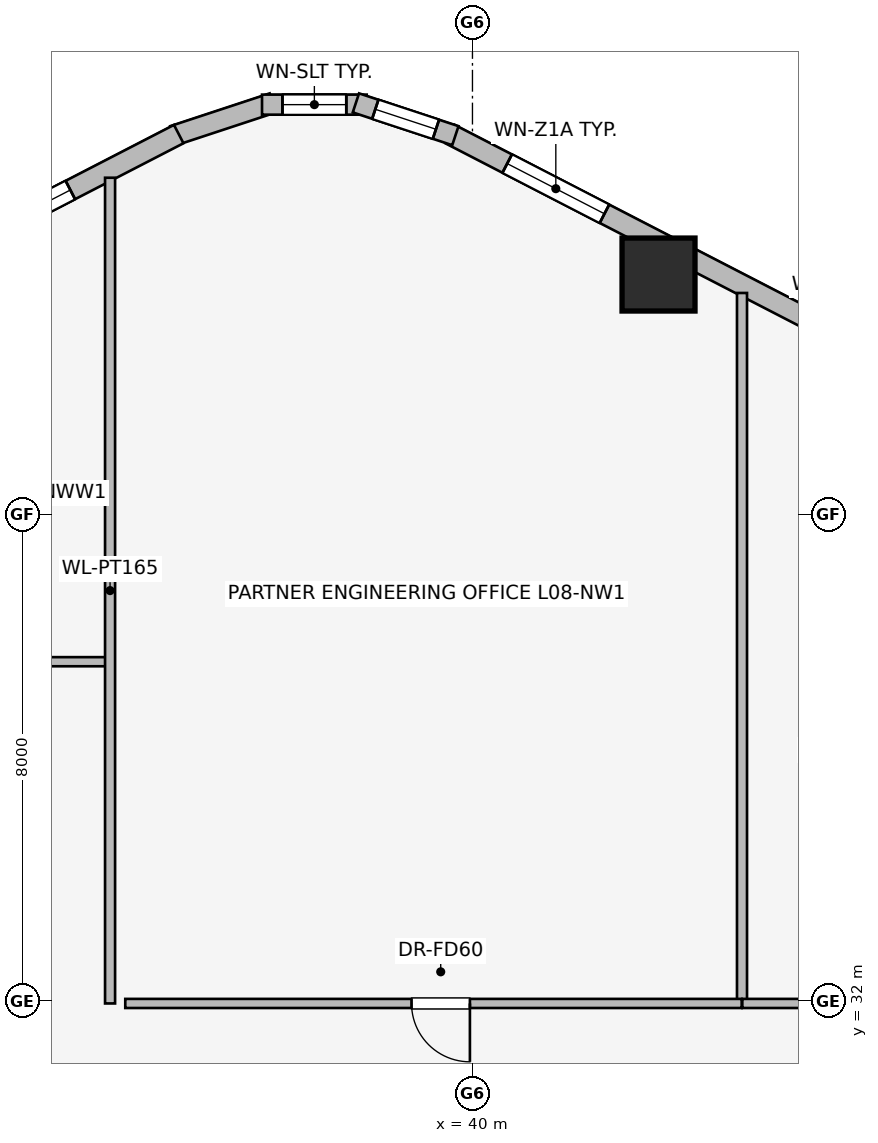
"""IFC4 building model, lengths in metres.
Left out: names, types, materials, properties, quantities, classifications, styles, units other than length and angle.
Written with IfcOpenShell. Run it as: python <this file> out.ifc"""

import sys

from ifc_helpers import new_model, si_unit, direction, frame, frame_2d, origin, origin_2d, place, context, subcontext, project, spatial, rectangle, extrude, element, fill, save


model = new_model("IFC4")
c1 = context("Model", 3, precision=1e-05, world=origin(), true_north=direction((0.0, 1.0)))
c2 = subcontext(c1, "Body", "Model", "MODEL_VIEW")
j1 = project(units=[si_unit("LENGTHUNIT", "METRE"), si_unit("PLANEANGLEUNIT", "RADIAN")], contexts=[c1])
p1 = place(None, origin())
s1 = spatial("IfcSite", under=j1, at=p1, CompositionType="ELEMENT")
p2 = place(p1, origin())
s2 = spatial("IfcBuilding", under=s1, at=p2, CompositionType="ELEMENT")
p3 = place(p2, frame((0.0, 0.0, 34.3)))
s3 = spatial("IfcBuildingStorey", under=s2, at=p3, CompositionType="ELEMENT", Elevation=34.3)
p4 = place(p3, frame((43.06, 43.947, 0.0), z_axis=(0.0, 0.0, 1.0), x_axis=(1.0, 0.0, 0.0)))
e1 = element("IfcColumn", 1, at=p4, inside=s3, PredefinedType="COLUMN", context=c2, shape_type="SweptSolid", body=[
    extrude(rectangle(XDim=1.2, YDim=1.2, at=origin_2d()), origin(), (0.0, 0.0, 1.0), 3.65),
])
p5 = place(p3, frame((39.631, 46.257, 0.0), z_axis=(0.0, 0.0, 1.0), x_axis=(0.888634413993, -0.458616264721, 0.0)))
e2 = element("IfcWall", 2, at=p5, inside=s3, PredefinedType="STANDARD", context=c2, shape_type="SweptSolid", body=[
    extrude(rectangle(XDim=20.531, YDim=0.34, at=frame_2d((10.266, 0.0))), origin(), (0.0, 0.0, 1.0), 2.684),
])
p6 = place(p5, frame((1.058, 0.0, 0.75)))
e3 = element("IfcOpeningElement", 3, at=p6, cuts=e2, PredefinedType="OPENING", context=c2, shape_type="SweptSolid", body=[
    extrude(rectangle(XDim=1.8, YDim=1.5, at=frame_2d((0.9, 0.75))), frame((0.0, 0.18, 0.0), z_axis=(0.0, -1.0, 0.0), x_axis=(1.0, 0.0, 0.0)), (0.0, 0.0, 1.0), 0.36),
])
p7 = place(p5, frame((6.721, 0.0, 0.75)))
e4 = element("IfcOpeningElement", 4, at=p7, cuts=e2, PredefinedType="OPENING", context=c2, shape_type="SweptSolid", body=[
    extrude(rectangle(XDim=1.5, YDim=1.5, at=frame_2d((0.75, 0.75))), frame((0.0, 0.18, 0.0), z_axis=(0.0, -1.0, 0.0), x_axis=(1.0, 0.0, 0.0)), (0.0, 0.0, 1.0), 0.36),
])
p8 = place(p5, frame((10.007, 0.0, 0.75)))
e5 = element("IfcOpeningElement", 5, at=p8, cuts=e2, PredefinedType="OPENING", context=c2, shape_type="SweptSolid", body=[
    extrude(rectangle(XDim=1.5, YDim=1.5, at=frame_2d((0.75, 0.75))), frame((0.0, 0.18, 0.0), z_axis=(0.0, -1.0, 0.0), x_axis=(1.0, 0.0, 0.0)), (0.0, 0.0, 1.0), 0.36),
])
p9 = place(p5, frame((13.292, 0.0, 0.75)))
e6 = element("IfcOpeningElement", 6, at=p9, cuts=e2, PredefinedType="OPENING", context=c2, shape_type="SweptSolid", body=[
    extrude(rectangle(XDim=1.5, YDim=1.5, at=frame_2d((0.75, 0.75))), frame((0.0, 0.18, 0.0), z_axis=(0.0, -1.0, 0.0), x_axis=(1.0, 0.0, 0.0)), (0.0, 0.0, 1.0), 0.36),
])
p10 = place(p5, frame((17.673, 0.0, 0.75)))
e7 = element("IfcOpeningElement", 7, at=p10, cuts=e2, PredefinedType="OPENING", context=c2, shape_type="SweptSolid", body=[
    extrude(rectangle(XDim=1.8, YDim=1.5, at=frame_2d((0.9, 0.75))), frame((0.0, 0.18, 0.0), z_axis=(0.0, -1.0, 0.0), x_axis=(1.0, 0.0, 0.0)), (0.0, 0.0, 1.0), 0.36),
])
p11 = place(p3, frame((35.081, 46.231, 0.0), z_axis=(0.0, 0.0, 1.0), x_axis=(0.94976901097, 0.312951794691, 0.0)))
e8 = element("IfcWall", 8, at=p11, inside=s3, PredefinedType="STANDARD", context=c2, shape_type="SweptSolid", body=[
    extrude(rectangle(XDim=1.722, YDim=0.33, at=frame_2d((0.861, 0.0))), origin(), (0.0, 0.0, 1.0), 3.39),
])
p12 = place(p3, frame((36.539, 46.741, 0.0), z_axis=(0.0, 0.0, 1.0), x_axis=(1.0, 0.0, 0.0)))
e9 = element("IfcWall", 9, at=p12, inside=s3, PredefinedType="STANDARD", context=c2, shape_type="SweptSolid", body=[
    extrude(rectangle(XDim=1.722, YDim=0.33, at=frame_2d((0.861, 0.0))), origin(), (0.0, 0.0, 1.0), 3.39),
])
p13 = place(p12, frame((0.336, 0.0, 0.75)))
e10 = element("IfcOpeningElement", 10, at=p13, cuts=e9, PredefinedType="OPENING", context=c2, shape_type="SweptSolid", body=[
    extrude(rectangle(XDim=1.05, YDim=1.4, at=frame_2d((0.525, 0.7))), frame((0.0, 0.175, 0.0), z_axis=(0.0, -1.0, 0.0), x_axis=(1.0, 0.0, 0.0)), (0.0, 0.0, 1.0), 0.35),
])
p14 = place(p3, frame((38.083, 46.77, 0.0), z_axis=(0.0, 0.0, 1.0), x_axis=(0.94976901097, -0.312951794691, 0.0)))
e11 = element("IfcWall", 11, at=p14, inside=s3, PredefinedType="STANDARD", context=c2, shape_type="SweptSolid", body=[
    extrude(rectangle(XDim=1.722, YDim=0.33, at=frame_2d((0.861, 0.0))), origin(), (0.0, 0.0, 1.0), 3.39),
])
p15 = place(p14, frame((0.336, 0.0, 0.75)))
e12 = element("IfcOpeningElement", 12, at=p15, cuts=e11, PredefinedType="OPENING", context=c2, shape_type="SweptSolid", body=[
    extrude(rectangle(XDim=1.05, YDim=1.4, at=frame_2d((0.525, 0.7))), frame((0.0, 0.175, 0.0), z_axis=(0.0, -1.0, 0.0), x_axis=(1.0, 0.0, 0.0)), (0.0, 0.0, 1.0), 0.35),
])
p16 = place(p3, frame((16.924, 36.841, 0.0), z_axis=(0.0, 0.0, 1.0), x_axis=(0.888634413993, 0.458616264721, 0.0)))
e13 = element("IfcWall", 13, at=p16, inside=s3, PredefinedType="STANDARD", context=c2, shape_type="SweptSolid", body=[
    extrude(rectangle(XDim=20.531, YDim=0.34, at=frame_2d((10.266, 0.0))), origin(), (0.0, 0.0, 1.0), 2.684),
])
p17 = place(p16, frame((2.161, 0.0, 0.75)))
e14 = element("IfcOpeningElement", 14, at=p17, cuts=e13, PredefinedType="OPENING", context=c2, shape_type="SweptSolid", body=[
    extrude(rectangle(XDim=1.05, YDim=1.4, at=frame_2d((0.525, 0.7))), frame((0.0, 0.18, 0.0), z_axis=(0.0, -1.0, 0.0), x_axis=(1.0, 0.0, 0.0)), (0.0, 0.0, 1.0), 0.36),
])
p18 = place(p16, frame((5.903, 0.0, 0.75)))
e15 = element("IfcOpeningElement", 15, at=p18, cuts=e13, PredefinedType="OPENING", context=c2, shape_type="SweptSolid", body=[
    extrude(rectangle(XDim=1.5, YDim=1.5, at=frame_2d((0.75, 0.75))), frame((0.0, 0.18, 0.0), z_axis=(0.0, -1.0, 0.0), x_axis=(1.0, 0.0, 0.0)), (0.0, 0.0, 1.0), 0.36),
])
p19 = place(p16, frame((9.516, 0.0, 0.75)))
e16 = element("IfcOpeningElement", 16, at=p19, cuts=e13, PredefinedType="OPENING", context=c2, shape_type="SweptSolid", body=[
    extrude(rectangle(XDim=1.5, YDim=1.5, at=frame_2d((0.75, 0.75))), frame((0.0, 0.18, 0.0), z_axis=(0.0, -1.0, 0.0), x_axis=(1.0, 0.0, 0.0)), (0.0, 0.0, 1.0), 0.36),
])
p20 = place(p16, frame((13.129, 0.0, 0.75)))
e17 = element("IfcOpeningElement", 17, at=p20, cuts=e13, PredefinedType="OPENING", context=c2, shape_type="SweptSolid", body=[
    extrude(rectangle(XDim=1.5, YDim=1.5, at=frame_2d((0.75, 0.75))), frame((0.0, 0.18, 0.0), z_axis=(0.0, -1.0, 0.0), x_axis=(1.0, 0.0, 0.0)), (0.0, 0.0, 1.0), 0.36),
])
p21 = place(p16, frame((17.476, 0.0, 0.75)))
e18 = element("IfcOpeningElement", 18, at=p21, cuts=e13, PredefinedType="OPENING", context=c2, shape_type="SweptSolid", body=[
    extrude(rectangle(XDim=1.05, YDim=1.4, at=frame_2d((0.525, 0.7))), frame((0.0, 0.18, 0.0), z_axis=(0.0, -1.0, 0.0), x_axis=(1.0, 0.0, 0.0)), (0.0, 0.0, 1.0), 0.36),
])
p22 = place(p3, frame((34.0, 37.58, 0.0), z_axis=(0.0, 0.0, 1.0), x_axis=(-1.0, 0.0, 0.0)))
e19 = element("IfcWall", 19, at=p22, inside=s3, PredefinedType="PARTITIONING", context=c2, shape_type="SweptSolid", body=[
    extrude(rectangle(XDim=15.6, YDim=0.15, at=frame_2d((7.8, 0.0))), origin(), (0.0, 0.0, 1.0), 3.39),
])
p23 = place(p22, frame((5.195, 0.0, 0.0)))
e20 = element("IfcOpeningElement", 20, at=p23, cuts=e19, PredefinedType="OPENING", context=c2, shape_type="SweptSolid", body=[
    extrude(rectangle(XDim=0.96, YDim=2.0, at=frame_2d((0.48, 1.0))), frame((0.0, 0.085, 0.0), z_axis=(0.0, -1.0, 0.0), x_axis=(1.0, 0.0, 0.0)), (0.0, 0.0, 1.0), 0.17),
])
p24 = place(p3, frame((34.04, 31.96, 0.0), z_axis=(0.0, 0.0, 1.0), x_axis=(0.0, 1.0, 0.0)))
e21 = element("IfcWall", 21, at=p24, inside=s3, PredefinedType="PARTITIONING", context=c2, shape_type="SweptSolid", body=[
    extrude(rectangle(XDim=13.579, YDim=0.165, at=frame_2d((6.79, 0.0))), origin(), (0.0, 0.0, 1.0), 3.39),
])
p25 = place(p3, frame((44.433, 31.97, 0.0), z_axis=(0.0, 0.0, 1.0), x_axis=(0.0, 1.0, 0.0)))
e22 = element("IfcWall", 22, at=p25, inside=s3, PredefinedType="PARTITIONING", context=c2, shape_type="SweptSolid", body=[
    extrude(rectangle(XDim=11.674, YDim=0.165, at=frame_2d((5.837, 0.0))), origin(), (0.0, 0.0, 1.0), 3.39),
])
p26 = place(p3, frame((44.428, 31.96, 0.0), z_axis=(0.0, 0.0, 1.0), x_axis=(-1.0, 0.0, 0.0)))
e23 = element("IfcWall", 23, at=p26, inside=s3, PredefinedType="PARTITIONING", context=c2, shape_type="SweptSolid", body=[
    extrude(rectangle(XDim=10.138, YDim=0.15, at=frame_2d((5.069, 0.0))), origin(), (0.0, 0.0, 1.0), 3.39),
])
p27 = place(p26, frame((4.47, 0.0, 0.0)))
e24 = element("IfcOpeningElement", 24, at=p27, cuts=e23, PredefinedType="OPENING", context=c2, shape_type="SweptSolid", body=[
    extrude(rectangle(XDim=0.96, YDim=2.0, at=frame_2d((0.48, 1.0))), frame((0.0, 0.085, 0.0), z_axis=(0.0, -1.0, 0.0), x_axis=(1.0, 0.0, 0.0)), (0.0, 0.0, 1.0), 0.17),
])
p28 = place(p3, frame((60.032, 31.96, 0.0), z_axis=(0.0, 0.0, 1.0), x_axis=(-1.0, 0.0, 0.0)))
e25 = element("IfcWall", 25, at=p28, inside=s3, PredefinedType="PARTITIONING", context=c2, shape_type="SweptSolid", body=[
    extrude(rectangle(XDim=15.594, YDim=0.15, at=frame_2d((7.797, 0.0))), origin(), (0.0, 0.0, 1.0), 3.39),
])
p29 = place(p28, frame((7.437, 0.0, 0.0)))
e26 = element("IfcOpeningElement", 26, at=p29, cuts=e25, PredefinedType="OPENING", context=c2, shape_type="SweptSolid", body=[
    extrude(rectangle(XDim=0.96, YDim=2.0, at=frame_2d((0.48, 1.0))), frame((0.0, 0.085, 0.0), z_axis=(0.0, -1.0, 0.0), x_axis=(1.0, 0.0, 0.0)), (0.0, 0.0, 1.0), 0.17),
])
p30 = place(p6, origin())
e27 = element("IfcWindow", 27, at=p30, inside=s3, PartitioningType="SINGLE_PANEL", PredefinedType="WINDOW", context=c2, shape_type="SweptSolid", body=[
    extrude(rectangle(XDim=1.8, YDim=1.5, at=frame_2d((0.9, 0.75))), frame((0.0, 0.03, 0.0), z_axis=(0.0, -1.0, 0.0), x_axis=(1.0, 0.0, 0.0)), (0.0, 0.0, 1.0), 0.06),
])
fill(e3, e27)
p31 = place(p13, origin())
e28 = element("IfcWindow", 28, at=p31, inside=s3, PartitioningType="SINGLE_PANEL", PredefinedType="WINDOW", context=c2, shape_type="SweptSolid", body=[
    extrude(rectangle(XDim=1.05, YDim=1.4, at=frame_2d((0.525, 0.7))), frame((0.0, 0.03, 0.0), z_axis=(0.0, -1.0, 0.0), x_axis=(1.0, 0.0, 0.0)), (0.0, 0.0, 1.0), 0.06),
])
fill(e10, e28)
p32 = place(p15, origin())
e29 = element("IfcWindow", 29, at=p32, inside=s3, PartitioningType="SINGLE_PANEL", PredefinedType="WINDOW", context=c2, shape_type="SweptSolid", body=[
    extrude(rectangle(XDim=1.05, YDim=1.4, at=frame_2d((0.525, 0.7))), frame((0.0, 0.03, 0.0), z_axis=(0.0, -1.0, 0.0), x_axis=(1.0, 0.0, 0.0)), (0.0, 0.0, 1.0), 0.06),
])
fill(e12, e29)
p33 = place(p21, origin())
e30 = element("IfcWindow", 30, at=p33, inside=s3, PartitioningType="SINGLE_PANEL", PredefinedType="WINDOW", context=c2, shape_type="SweptSolid", body=[
    extrude(rectangle(XDim=1.05, YDim=1.4, at=frame_2d((0.525, 0.7))), frame((0.0, 0.03, 0.0), z_axis=(0.0, -1.0, 0.0), x_axis=(1.0, 0.0, 0.0)), (0.0, 0.0, 1.0), 0.06),
])
fill(e18, e30)
p34 = place(p27, origin())
e31 = element("IfcDoor", 31, at=p34, inside=s3, OperationType="SINGLE_SWING_LEFT", PredefinedType="DOOR", context=c2, shape_type="SweptSolid", body=[
    extrude(rectangle(XDim=0.96, YDim=2.0, at=frame_2d((0.48, 1.0))), frame((0.0, 0.025, 0.0), z_axis=(0.0, -1.0, 0.0), x_axis=(1.0, 0.0, 0.0)), (0.0, 0.0, 1.0), 0.05),
])
fill(e24, e31)
save(model, sys.argv[1])
